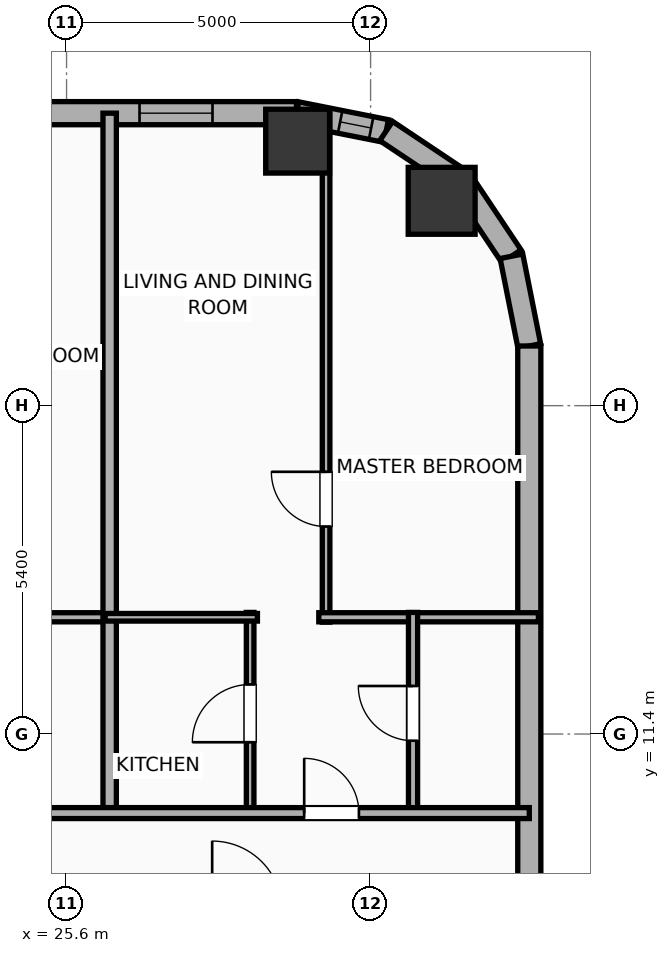
"""IFC4 building model, lengths in metres.
Left out: names, types, materials, properties, quantities, classifications, styles, units other than length and angle.
Written with IfcOpenShell. Run it as: python <this file> out.ifc"""

import sys

from ifc_helpers import new_model, si_unit, direction, frame, frame_2d, origin, origin_2d, place, context, subcontext, project, spatial, rectangle, hollow_rectangle, hollow_circle, extrude, element, fill, save


model = new_model("IFC4")
c1 = context("Model", 3, precision=1e-05, world=origin(), true_north=direction((0.0, 1.0)))
c2 = subcontext(c1, "Body", "Model", "MODEL_VIEW")
j1 = project(units=[si_unit("LENGTHUNIT", "METRE"), si_unit("PLANEANGLEUNIT", "RADIAN")], contexts=[c1])
p1 = place(None, origin())
s1 = spatial("IfcSite", under=j1, at=p1, CompositionType="ELEMENT")
p2 = place(p1, origin())
s2 = spatial("IfcBuilding", under=s1, at=p2, CompositionType="ELEMENT")
p3 = place(p2, frame((0.0, 0.0, 97.5)))
s3 = spatial("IfcBuildingStorey", under=s2, at=p3, CompositionType="ELEMENT", Elevation=97.5)
p4 = place(p3, frame((31.769, 20.169, 0.0), z_axis=(0.0, 0.0, 1.0), x_axis=(1.0, 0.0, 0.0)))
e1 = element("IfcColumn", 1, at=p4, inside=s3, PredefinedType="COLUMN", context=c2, shape_type="SweptSolid", body=[
    extrude(hollow_circle(Radius=0.55, WallThickness=0.036, at=origin_2d()), origin(), (0.0, 0.0, 1.0), 3.9),
])
p5 = place(p3, frame((29.4, 21.15, 0.0), z_axis=(0.0, 0.0, 1.0), x_axis=(1.0, 0.0, 0.0)))
e2 = element("IfcColumn", 2, at=p5, inside=s3, PredefinedType="COLUMN", context=c2, shape_type="SweptSolid", body=[
    extrude(hollow_rectangle(XDim=1.05, YDim=1.05, WallThickness=0.036, at=origin_2d()), origin(), (0.0, 0.0, 1.0), 3.9),
])
p6 = place(p3, frame((-25.381, 21.61, 0.0), z_axis=(0.0, 0.0, 1.0), x_axis=(1.0, 0.0, 0.0)))
e3 = element("IfcWall", 3, at=p6, inside=s3, PredefinedType="ELEMENTEDWALL", context=c2, shape_type="SweptSolid", body=[
    extrude(rectangle(XDim=54.763, YDim=0.38, at=frame_2d((27.381, 0.0))), origin(), (0.0, 0.0, 1.0), 3.65),
])
p7 = place(p6, frame((45.067, 0.0, 0.75)))
e4 = element("IfcOpeningElement", 4, at=p7, cuts=e3, PredefinedType="OPENING", context=c2, shape_type="SweptSolid", body=[
    extrude(rectangle(XDim=2.4, YDim=2.1, at=frame_2d((1.2, 1.05))), frame((0.0, 0.2, 0.0), z_axis=(0.0, -1.0, 0.0), x_axis=(1.0, 0.0, 0.0)), (0.0, 0.0, 1.0), 0.4),
])
p8 = place(p6, frame((4.076, 0.0, 0.75)))
e5 = element("IfcOpeningElement", 5, at=p8, cuts=e3, PredefinedType="OPENING", context=c2, shape_type="SweptSolid", body=[
    extrude(rectangle(XDim=1.2, YDim=2.05, at=frame_2d((0.6, 1.025))), frame((0.0, 0.2, 0.0), z_axis=(0.0, -1.0, 0.0), x_axis=(1.0, 0.0, 0.0)), (0.0, 0.0, 1.0), 0.4),
])
p9 = place(p6, frame((9.395, 0.0, 0.75)))
e6 = element("IfcOpeningElement", 6, at=p9, cuts=e3, PredefinedType="OPENING", context=c2, shape_type="SweptSolid", body=[
    extrude(rectangle(XDim=0.85, YDim=2.05, at=frame_2d((0.425, 1.025))), frame((0.0, 0.2, 0.0), z_axis=(0.0, -1.0, 0.0), x_axis=(1.0, 0.0, 0.0)), (0.0, 0.0, 1.0), 0.4),
])
p10 = place(p6, frame((7.205, 0.0, 0.75)))
e7 = element("IfcOpeningElement", 7, at=p10, cuts=e3, PredefinedType="OPENING", context=c2, shape_type="SweptSolid", body=[
    extrude(rectangle(XDim=1.2, YDim=2.05, at=frame_2d((0.6, 1.025))), frame((0.0, 0.2, 0.0), z_axis=(0.0, -1.0, 0.0), x_axis=(1.0, 0.0, 0.0)), (0.0, 0.0, 1.0), 0.4),
])
p11 = place(p6, frame((13.676, 0.0, 0.75)))
e8 = element("IfcOpeningElement", 8, at=p11, cuts=e3, PredefinedType="OPENING", context=c2, shape_type="SweptSolid", body=[
    extrude(rectangle(XDim=1.2, YDim=2.05, at=frame_2d((0.6, 1.025))), frame((0.0, 0.2, 0.0), z_axis=(0.0, -1.0, 0.0), x_axis=(1.0, 0.0, 0.0)), (0.0, 0.0, 1.0), 0.4),
])
p12 = place(p6, frame((17.136, 0.0, 0.75)))
e9 = element("IfcOpeningElement", 9, at=p12, cuts=e3, PredefinedType="OPENING", context=c2, shape_type="SweptSolid", body=[
    extrude(rectangle(XDim=1.2, YDim=2.05, at=frame_2d((0.6, 1.025))), frame((0.0, 0.2, 0.0), z_axis=(0.0, -1.0, 0.0), x_axis=(1.0, 0.0, 0.0)), (0.0, 0.0, 1.0), 0.4),
])
p13 = place(p6, frame((22.656, 0.0, 0.75)))
e10 = element("IfcOpeningElement", 10, at=p13, cuts=e3, PredefinedType="OPENING", context=c2, shape_type="SweptSolid", body=[
    extrude(rectangle(XDim=1.2, YDim=2.05, at=frame_2d((0.6, 1.025))), frame((0.0, 0.2, 0.0), z_axis=(0.0, -1.0, 0.0), x_axis=(1.0, 0.0, 0.0)), (0.0, 0.0, 1.0), 0.4),
])
p14 = place(p6, frame((29.443, 0.0, 0.75)))
e11 = element("IfcOpeningElement", 11, at=p14, cuts=e3, PredefinedType="OPENING", context=c2, shape_type="SweptSolid", body=[
    extrude(rectangle(XDim=1.2, YDim=2.05, at=frame_2d((0.6, 1.025))), frame((0.0, 0.2, 0.0), z_axis=(0.0, -1.0, 0.0), x_axis=(1.0, 0.0, 0.0)), (0.0, 0.0, 1.0), 0.4),
])
p15 = place(p6, frame((26.348, 0.0, 0.75)))
e12 = element("IfcOpeningElement", 12, at=p15, cuts=e3, PredefinedType="OPENING", context=c2, shape_type="SweptSolid", body=[
    extrude(rectangle(XDim=1.2, YDim=2.05, at=frame_2d((0.6, 1.025))), frame((0.0, 0.2, 0.0), z_axis=(0.0, -1.0, 0.0), x_axis=(1.0, 0.0, 0.0)), (0.0, 0.0, 1.0), 0.4),
])
p16 = place(p6, frame((33.596, 0.0, 0.75)))
e13 = element("IfcOpeningElement", 13, at=p16, cuts=e3, PredefinedType="OPENING", context=c2, shape_type="SweptSolid", body=[
    extrude(rectangle(XDim=1.2, YDim=2.05, at=frame_2d((0.6, 1.025))), frame((0.0, 0.2, 0.0), z_axis=(0.0, -1.0, 0.0), x_axis=(1.0, 0.0, 0.0)), (0.0, 0.0, 1.0), 0.4),
])
p17 = place(p6, frame((36.014, 0.0, 0.75)))
e14 = element("IfcOpeningElement", 14, at=p17, cuts=e3, PredefinedType="OPENING", context=c2, shape_type="SweptSolid", body=[
    extrude(rectangle(XDim=1.2, YDim=2.05, at=frame_2d((0.6, 1.025))), frame((0.0, 0.2, 0.0), z_axis=(0.0, -1.0, 0.0), x_axis=(1.0, 0.0, 0.0)), (0.0, 0.0, 1.0), 0.4),
])
p18 = place(p6, frame((40.814, 0.0, 0.75)))
e15 = element("IfcOpeningElement", 15, at=p18, cuts=e3, PredefinedType="OPENING", context=c2, shape_type="SweptSolid", body=[
    extrude(rectangle(XDim=1.2, YDim=2.05, at=frame_2d((0.6, 1.025))), frame((0.0, 0.2, 0.0), z_axis=(0.0, -1.0, 0.0), x_axis=(1.0, 0.0, 0.0)), (0.0, 0.0, 1.0), 0.4),
])
p19 = place(p6, frame((49.385, 0.0, 0.75)))
e16 = element("IfcOpeningElement", 16, at=p19, cuts=e3, PredefinedType="OPENING", context=c2, shape_type="SweptSolid", body=[
    extrude(rectangle(XDim=1.2, YDim=2.05, at=frame_2d((0.6, 1.025))), frame((0.0, 0.2, 0.0), z_axis=(0.0, -1.0, 0.0), x_axis=(1.0, 0.0, 0.0)), (0.0, 0.0, 1.0), 0.4),
])
p20 = place(p6, frame((52.181, 0.0, 0.75)))
e17 = element("IfcOpeningElement", 17, at=p20, cuts=e3, PredefinedType="OPENING", context=c2, shape_type="SweptSolid", body=[
    extrude(rectangle(XDim=1.2, YDim=2.05, at=frame_2d((0.6, 1.025))), frame((0.0, 0.2, 0.0), z_axis=(0.0, -1.0, 0.0), x_axis=(1.0, 0.0, 0.0)), (0.0, 0.0, 1.0), 0.4),
])
p21 = place(p3, frame((29.381, 21.61, 0.0), z_axis=(0.0, 0.0, 1.0), x_axis=(0.980755066645, -0.195242155415, 0.0)))
e18 = element("IfcWall", 18, at=p21, inside=s3, PredefinedType="ELEMENTEDWALL", context=c2, shape_type="SweptSolid", body=[
    extrude(rectangle(XDim=1.504, YDim=0.38, at=frame_2d((0.752, 0.0))), origin(), (0.0, 0.0, 1.0), 3.65),
])
p22 = place(p21, frame((0.732, 0.0, 0.75)))
e19 = element("IfcOpeningElement", 19, at=p22, cuts=e18, PredefinedType="OPENING", context=c2, shape_type="SweptSolid", body=[
    extrude(rectangle(XDim=0.52, YDim=2.05, at=frame_2d((0.26, 1.025))), frame((0.0, 0.2, 0.0), z_axis=(0.0, -1.0, 0.0), x_axis=(1.0, 0.0, 0.0)), (0.0, 0.0, 1.0), 0.4),
])
p23 = place(p3, frame((30.857, 21.316, 0.0), z_axis=(0.0, 0.0, 1.0), x_axis=(0.831468045563, -0.555572577804, 0.0)))
e20 = element("IfcWall", 20, at=p23, inside=s3, PredefinedType="ELEMENTEDWALL", context=c2, shape_type="SweptSolid", body=[
    extrude(rectangle(XDim=1.485, YDim=0.38, at=frame_2d((0.742, 0.0))), origin(), (0.0, 0.0, 1.0), 3.65),
])
p24 = place(p3, frame((32.091, 20.491, 0.0), z_axis=(0.0, 0.0, 1.0), x_axis=(0.555610286119, -0.831442848281, 0.0)))
e21 = element("IfcWall", 21, at=p24, inside=s3, PredefinedType="ELEMENTEDWALL", context=c2, shape_type="SweptSolid", body=[
    extrude(rectangle(XDim=1.485, YDim=0.38, at=frame_2d((0.743, 0.0))), origin(), (0.0, 0.0, 1.0), 3.65),
])
p25 = place(p3, frame((32.917, 19.257, 0.0), z_axis=(0.0, 0.0, 1.0), x_axis=(0.195086038585, -0.980786132421, 0.0)))
e22 = element("IfcWall", 22, at=p25, inside=s3, PredefinedType="ELEMENTEDWALL", context=c2, shape_type="SweptSolid", body=[
    extrude(rectangle(XDim=1.504, YDim=0.38, at=frame_2d((0.752, 0.0))), origin(), (0.0, 0.0, 1.0), 3.65),
])
p26 = place(p3, frame((33.21, 17.781, 0.0), z_axis=(0.0, 0.0, 1.0), x_axis=(0.0, -1.0, 0.0)))
e23 = element("IfcWall", 23, at=p26, inside=s3, PredefinedType="ELEMENTEDWALL", context=c2, shape_type="SweptSolid", body=[
    extrude(rectangle(XDim=34.363, YDim=0.38, at=frame_2d((17.181, 0.0))), origin(), (0.0, 0.0, 1.0), 3.65),
])
p27 = place(p26, frame((12.836, 0.0, 0.75)))
e24 = element("IfcOpeningElement", 24, at=p27, cuts=e23, PredefinedType="OPENING", context=c2, shape_type="SweptSolid", body=[
    extrude(rectangle(XDim=1.2, YDim=2.05, at=frame_2d((0.6, 1.025))), frame((0.0, 0.2, 0.0), z_axis=(0.0, -1.0, 0.0), x_axis=(1.0, 0.0, 0.0)), (0.0, 0.0, 1.0), 0.4),
])
p28 = place(p26, frame((21.386, 0.0, 0.75)))
e25 = element("IfcOpeningElement", 25, at=p28, cuts=e23, PredefinedType="OPENING", context=c2, shape_type="SweptSolid", body=[
    extrude(rectangle(XDim=1.2, YDim=2.05, at=frame_2d((0.6, 1.025))), frame((0.0, 0.2, 0.0), z_axis=(0.0, -1.0, 0.0), x_axis=(1.0, 0.0, 0.0)), (0.0, 0.0, 1.0), 0.4),
])
p29 = place(p3, frame((22.779, 13.32, 0.0), z_axis=(0.0, 0.0, 1.0), x_axis=(1.0, 0.0, 0.0)))
e26 = element("IfcWall", 26, at=p29, inside=s3, PredefinedType="PLUMBINGWALL", context=c2, shape_type="SweptSolid", body=[
    extrude(rectangle(XDim=3.605, YDim=0.15, at=frame_2d((1.802, 0.0))), origin(), (0.0, 0.0, 1.0), 3.65),
])
p30 = place(p3, frame((26.309, 10.02, 0.0), z_axis=(0.0, 0.0, 1.0), x_axis=(0.0, 1.0, 0.0)))
e27 = element("IfcWall", 27, at=p30, inside=s3, PredefinedType="PARTITIONING", context=c2, shape_type="SweptSolid", body=[
    extrude(rectangle(XDim=11.59, YDim=0.22, at=frame_2d((5.795, 0.0))), origin(), (0.0, 0.0, 1.0), 3.65),
])
p31 = place(p3, frame((29.868, 13.24, 0.0), z_axis=(0.0, 0.0, 1.0), x_axis=(0.0, 1.0, 0.0)))
e28 = element("IfcWall", 28, at=p31, inside=s3, PredefinedType="PARTITIONING", context=c2, shape_type="SweptSolid", body=[
    extrude(rectangle(XDim=8.426, YDim=0.125, at=frame_2d((4.213, 0.0))), origin(), (0.0, 0.0, 1.0), 3.65),
])
p32 = place(p31, frame((1.572, 0.0, 0.0)))
e29 = element("IfcOpeningElement", 29, at=p32, cuts=e28, PredefinedType="OPENING", context=c2, shape_type="SweptSolid", body=[
    extrude(rectangle(XDim=0.9, YDim=2.05, at=frame_2d((0.45, 1.025))), frame((0.0, 0.073, 0.0), z_axis=(0.0, -1.0, 0.0), x_axis=(1.0, 0.0, 0.0)), (0.0, 0.0, 1.0), 0.145),
])
p33 = place(p3, frame((29.748, 13.32, 0.0), z_axis=(0.0, 0.0, 1.0), x_axis=(1.0, 0.0, 0.0)))
e30 = element("IfcWall", 30, at=p33, inside=s3, PredefinedType="PLUMBINGWALL", context=c2, shape_type="SweptSolid", body=[
    extrude(rectangle(XDim=3.612, YDim=0.15, at=frame_2d((1.806, 0.0))), origin(), (0.0, 0.0, 1.0), 3.65),
])
p34 = place(p3, frame((28.619, 10.08, 0.0), z_axis=(0.0, 0.0, 1.0), x_axis=(0.0, 1.0, 0.0)))
e31 = element("IfcWall", 31, at=p34, inside=s3, PredefinedType="PARTITIONING", context=c2, shape_type="SweptSolid", body=[
    extrude(rectangle(XDim=3.32, YDim=0.125, at=frame_2d((1.66, 0.0))), origin(), (0.0, 0.0, 1.0), 3.65),
])
p35 = place(p34, frame((1.185, 0.0, 0.0)))
e32 = element("IfcOpeningElement", 32, at=p35, cuts=e31, PredefinedType="OPENING", context=c2, shape_type="SweptSolid", body=[
    extrude(rectangle(XDim=0.95, YDim=2.05, at=frame_2d((0.475, 1.025))), frame((0.0, 0.073, 0.0), z_axis=(0.0, -1.0, 0.0), x_axis=(1.0, 0.0, 0.0)), (0.0, 0.0, 1.0), 0.145),
])
p36 = place(p3, frame((26.234, 13.32, 0.0), z_axis=(0.0, 0.0, 1.0), x_axis=(1.0, 0.0, 0.0)))
e33 = element("IfcWall", 33, at=p36, inside=s3, PredefinedType="PARTITIONING", context=c2, shape_type="SweptSolid", body=[
    extrude(rectangle(XDim=2.505, YDim=0.125, at=frame_2d((1.252, 0.0))), origin(), (0.0, 0.0, 1.0), 3.65),
])
p37 = place(p3, frame((31.298, 10.08, 0.0), z_axis=(0.0, 0.0, 1.0), x_axis=(0.0, 1.0, 0.0)))
e34 = element("IfcWall", 34, at=p37, inside=s3, PredefinedType="PLUMBINGWALL", context=c2, shape_type="SweptSolid", body=[
    extrude(rectangle(XDim=3.32, YDim=0.15, at=frame_2d((1.66, 0.0))), origin(), (0.0, 0.0, 1.0), 3.65),
])
p38 = place(p37, frame((1.21, 0.0, 0.0)))
e35 = element("IfcOpeningElement", 35, at=p38, cuts=e34, PredefinedType="OPENING", context=c2, shape_type="SweptSolid", body=[
    extrude(rectangle(XDim=0.9, YDim=2.05, at=frame_2d((0.45, 1.025))), frame((0.0, 0.085, 0.0), z_axis=(0.0, -1.0, 0.0), x_axis=(1.0, 0.0, 0.0)), (0.0, 0.0, 1.0), 0.17),
])
p39 = place(p3, frame((-29.21, 10.1, 0.0), z_axis=(0.0, 0.0, 1.0), x_axis=(1.0, 0.0, 0.0)))
e36 = element("IfcWall", 36, at=p39, inside=s3, PredefinedType="PARTITIONING", context=c2, shape_type="SweptSolid", body=[
    extrude(rectangle(XDim=62.42, YDim=0.18, at=frame_2d((31.21, 0.0))), origin(), (0.0, 0.0, 1.0), 3.65),
])
p40 = place(p39, frame((4.906, 0.0, 0.0)))
e37 = element("IfcOpeningElement", 37, at=p40, cuts=e36, PredefinedType="OPENING", context=c2, shape_type="SweptSolid", body=[
    extrude(rectangle(XDim=1.15, YDim=2.05, at=frame_2d((0.575, 1.025))), frame((0.0, 0.1, 0.0), z_axis=(0.0, -1.0, 0.0), x_axis=(1.0, 0.0, 0.0)), (0.0, 0.0, 1.0), 0.2),
])
p41 = place(p39, frame((14.812, 0.0, 0.0)))
e38 = element("IfcOpeningElement", 38, at=p41, cuts=e36, PredefinedType="OPENING", context=c2, shape_type="SweptSolid", body=[
    extrude(rectangle(XDim=1.15, YDim=2.05, at=frame_2d((0.575, 1.025))), frame((0.0, 0.1, 0.0), z_axis=(0.0, -1.0, 0.0), x_axis=(1.0, 0.0, 0.0)), (0.0, 0.0, 1.0), 0.2),
])
p42 = place(p39, frame((24.406, 0.0, 0.0)))
e39 = element("IfcOpeningElement", 39, at=p42, cuts=e36, PredefinedType="OPENING", context=c2, shape_type="SweptSolid", body=[
    extrude(rectangle(XDim=1.15, YDim=2.05, at=frame_2d((0.575, 1.025))), frame((0.0, 0.1, 0.0), z_axis=(0.0, -1.0, 0.0), x_axis=(1.0, 0.0, 0.0)), (0.0, 0.0, 1.0), 0.2),
])
p43 = place(p39, frame((33.981, 0.0, 0.0)))
e40 = element("IfcOpeningElement", 40, at=p43, cuts=e36, PredefinedType="OPENING", context=c2, shape_type="SweptSolid", body=[
    extrude(rectangle(XDim=1.15, YDim=2.05, at=frame_2d((0.575, 1.025))), frame((0.0, 0.1, 0.0), z_axis=(0.0, -1.0, 0.0), x_axis=(1.0, 0.0, 0.0)), (0.0, 0.0, 1.0), 0.2),
])
p44 = place(p39, frame((43.138, 0.0, 0.0)))
e41 = element("IfcOpeningElement", 41, at=p44, cuts=e36, PredefinedType="OPENING", context=c2, shape_type="SweptSolid", body=[
    extrude(rectangle(XDim=1.15, YDim=2.05, at=frame_2d((0.575, 1.025))), frame((0.0, 0.1, 0.0), z_axis=(0.0, -1.0, 0.0), x_axis=(1.0, 0.0, 0.0)), (0.0, 0.0, 1.0), 0.2),
])
p45 = place(p39, frame((51.777, 0.0, 0.0)))
e42 = element("IfcOpeningElement", 42, at=p45, cuts=e36, PredefinedType="OPENING", context=c2, shape_type="SweptSolid", body=[
    extrude(rectangle(XDim=0.9, YDim=2.05, at=frame_2d((0.45, 1.025))), frame((0.0, 0.1, 0.0), z_axis=(0.0, -1.0, 0.0), x_axis=(1.0, 0.0, 0.0)), (0.0, 0.0, 1.0), 0.2),
])
p46 = place(p39, frame((58.718, 0.0, 0.0)))
e43 = element("IfcOpeningElement", 43, at=p46, cuts=e36, PredefinedType="OPENING", context=c2, shape_type="SweptSolid", body=[
    extrude(rectangle(XDim=0.9, YDim=2.05, at=frame_2d((0.45, 1.025))), frame((0.0, 0.1, 0.0), z_axis=(0.0, -1.0, 0.0), x_axis=(1.0, 0.0, 0.0)), (0.0, 0.0, 1.0), 0.2),
])
p47 = place(p20, origin())
e44 = element("IfcWindow", 44, at=p47, inside=s3, PartitioningType="SINGLE_PANEL", PredefinedType="WINDOW", context=c2, shape_type="SweptSolid", body=[
    extrude(rectangle(XDim=1.2, YDim=2.05, at=frame_2d((0.6, 1.025))), frame((0.0, 0.03, 0.0), z_axis=(0.0, -1.0, 0.0), x_axis=(1.0, 0.0, 0.0)), (0.0, 0.0, 1.0), 0.06),
])
fill(e17, e44)
p48 = place(p22, origin())
e45 = element("IfcWindow", 45, at=p48, inside=s3, PartitioningType="SINGLE_PANEL", PredefinedType="WINDOW", context=c2, shape_type="SweptSolid", body=[
    extrude(rectangle(XDim=0.52, YDim=2.05, at=frame_2d((0.26, 1.025))), frame((0.0, 0.03, 0.0), z_axis=(0.0, -1.0, 0.0), x_axis=(1.0, 0.0, 0.0)), (0.0, 0.0, 1.0), 0.06),
])
fill(e19, e45)
p49 = place(p32, origin())
e46 = element("IfcDoor", 46, at=p49, inside=s3, OperationType="SINGLE_SWING_RIGHT", PredefinedType="DOOR", context=c2, shape_type="SweptSolid", body=[
    extrude(rectangle(XDim=0.9, YDim=2.05, at=frame_2d((0.45, 1.025))), frame((0.0, 0.025, 0.0), z_axis=(0.0, -1.0, 0.0), x_axis=(1.0, 0.0, 0.0)), (0.0, 0.0, 1.0), 0.05),
])
fill(e29, e46)
p50 = place(p35, origin())
e47 = element("IfcDoor", 47, at=p50, inside=s3, OperationType="SINGLE_SWING_LEFT", PredefinedType="DOOR", context=c2, shape_type="SweptSolid", body=[
    extrude(rectangle(XDim=0.95, YDim=2.05, at=frame_2d((0.475, 1.025))), frame((0.0, 0.025, 0.0), z_axis=(0.0, -1.0, 0.0), x_axis=(1.0, 0.0, 0.0)), (0.0, 0.0, 1.0), 0.05),
])
fill(e32, e47)
p51 = place(p38, origin())
e48 = element("IfcDoor", 48, at=p51, inside=s3, OperationType="SINGLE_SWING_RIGHT", PredefinedType="DOOR", context=c2, shape_type="SweptSolid", body=[
    extrude(rectangle(XDim=0.9, YDim=2.05, at=frame_2d((0.45, 1.025))), frame((0.0, 0.025, 0.0), z_axis=(0.0, -1.0, 0.0), x_axis=(1.0, 0.0, 0.0)), (0.0, 0.0, 1.0), 0.05),
])
fill(e35, e48)
p52 = place(p46, origin())
e49 = element("IfcDoor", 49, at=p52, inside=s3, OperationType="SINGLE_SWING_LEFT", PredefinedType="DOOR", context=c2, shape_type="SweptSolid", body=[
    extrude(rectangle(XDim=0.9, YDim=2.05, at=frame_2d((0.45, 1.025))), frame((0.0, 0.025, 0.0), z_axis=(0.0, -1.0, 0.0), x_axis=(1.0, 0.0, 0.0)), (0.0, 0.0, 1.0), 0.05),
])
fill(e43, e49)
save(model, sys.argv[1])
